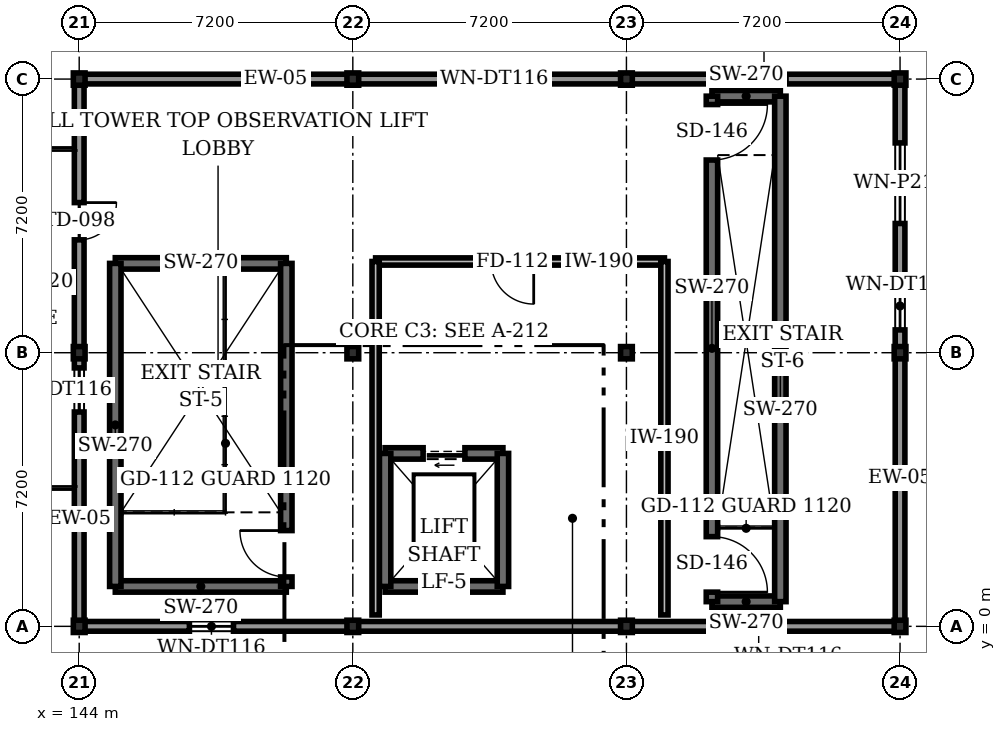
"""IFC4 building model, lengths in metres.
Left out: names, types, materials, properties, quantities, classifications, styles, units other than length and angle.
Written with IfcOpenShell. Run it as: python <this file> out.ifc"""

import sys

from ifc_helpers import new_model, si_unit, direction, frame, frame_2d, origin, origin_2d, place, context, subcontext, project, spatial, rectangle, i_section, extrude, element, fill, save


model = new_model("IFC4")
c1 = context("Model", 3, precision=1e-05, world=origin(), true_north=direction((0.0, 1.0)))
c2 = subcontext(c1, "Body", "Model", "MODEL_VIEW")
j1 = project(units=[si_unit("LENGTHUNIT", "METRE"), si_unit("PLANEANGLEUNIT", "RADIAN")], contexts=[c1])
p1 = place(None, origin())
s1 = spatial("IfcSite", under=j1, at=p1, CompositionType="ELEMENT")
p2 = place(p1, origin())
s2 = spatial("IfcBuilding", under=s1, at=p2, CompositionType="ELEMENT")
p3 = place(p2, frame((0.0, 0.0, 22.2)))
s3 = spatial("IfcBuildingStorey", under=s2, at=p3, CompositionType="ELEMENT", Elevation=22.2)
for number, where, z_axis, x_axis in (
    (1, (144.0, 0.0, 0.0), (0.0, 0.0, 1.0), (1.0, 0.0, 0.0)),
    (2, (144.0, 7.2, 0.0), (0.0, 0.0, 1.0), (1.0, 0.0, 0.0)),
    (3, (144.0, 14.4, 0.0), (0.0, 0.0, 1.0), (1.0, 0.0, 0.0)),
    (4, (151.2, 0.0, 0.0), (0.0, 0.0, 1.0), (1.0, 0.0, 0.0)),
    (5, (151.2, 7.2, 0.0), (0.0, 0.0, 1.0), (1.0, 0.0, 0.0)),
    (6, (151.2, 14.4, 0.0), (0.0, 0.0, 1.0), (1.0, 0.0, 0.0)),
    (7, (158.4, 0.0, 0.0), (0.0, 0.0, 1.0), (1.0, 0.0, 0.0)),
    (8, (158.4, 7.2, 0.0), (0.0, 0.0, 1.0), (1.0, 0.0, 0.0)),
    (9, (158.4, 14.4, 0.0), (0.0, 0.0, 1.0), (1.0, 0.0, 0.0)),
    (10, (165.6, 0.0, 0.0), (0.0, 0.0, 1.0), (1.0, 0.0, 0.0)),
    (11, (165.6, 7.2, 0.0), (0.0, 0.0, 1.0), (1.0, 0.0, 0.0)),
    (12, (165.6, 14.4, 0.0), (0.0, 0.0, 1.0), (1.0, 0.0, 0.0)),
):
    element("IfcColumn", number, at=place(p3, frame(where, z_axis=z_axis, x_axis=x_axis)), inside=s3, PredefinedType="COLUMN", context=c2, shape_type="SweptSolid", body=[
        extrude(i_section(OverallWidth=0.309, OverallDepth=0.323, WebThickness=0.014, FlangeThickness=0.023, at=origin_2d()), origin(), (0.0, 0.0, 1.0), 4.2),
    ])
p4 = place(p3, frame((165.6, 0.0, 0.0), z_axis=(0.0, 0.0, 1.0), x_axis=(-1.0, 0.0, 0.0)))
e13 = element("IfcWall", 13, at=p4, inside=s3, PredefinedType="STANDARD", context=c2, shape_type="SweptSolid", body=[
    extrude(rectangle(XDim=21.6, YDim=0.255, at=frame_2d((10.8, 0.0))), origin(), (0.0, 0.0, 1.0), 3.35),
])
p5 = place(p4, frame((17.54, 0.0, 1.15)))
e14 = element("IfcOpeningElement", 14, at=p5, cuts=e13, PredefinedType="OPENING", context=c2, shape_type="SweptSolid", body=[
    extrude(rectangle(XDim=1.16, YDim=1.34, at=frame_2d((0.58, 0.67))), frame((0.0, 0.137, 0.0), z_axis=(0.0, -1.0, 0.0), x_axis=(1.0, 0.0, 0.0)), (0.0, 0.0, 1.0), 0.275),
])
p6 = place(p4, frame((3.14, 0.0, 1.15)))
e15 = element("IfcOpeningElement", 15, at=p6, cuts=e13, PredefinedType="OPENING", context=c2, shape_type="SweptSolid", body=[
    extrude(rectangle(XDim=1.16, YDim=1.34, at=frame_2d((0.58, 0.67))), frame((0.0, 0.137, 0.0), z_axis=(0.0, -1.0, 0.0), x_axis=(1.0, 0.0, 0.0)), (0.0, 0.0, 1.0), 0.275),
])
p7 = place(p3, frame((165.6, 0.0, 0.0), z_axis=(0.0, 0.0, 1.0), x_axis=(0.0, 1.0, 0.0)))
e16 = element("IfcWall", 16, at=p7, inside=s3, PredefinedType="STANDARD", context=c2, shape_type="SweptSolid", body=[
    extrude(rectangle(XDim=14.4, YDim=0.255, at=frame_2d((7.2, 0.0))), origin(), (0.0, 0.0, 1.0), 3.35),
])
p8 = place(p7, frame((7.8, 0.0, 1.05)))
e17 = element("IfcOpeningElement", 17, at=p8, cuts=e16, PredefinedType="OPENING", context=c2, shape_type="SweptSolid", body=[
    extrude(rectangle(XDim=1.26, YDim=1.38, at=frame_2d((0.63, 0.69))), frame((0.0, 0.137, 0.0), z_axis=(0.0, -1.0, 0.0), x_axis=(1.0, 0.0, 0.0)), (0.0, 0.0, 1.0), 0.275),
])
p9 = place(p7, frame((10.6, 0.0, 1.05)))
e18 = element("IfcOpeningElement", 18, at=p9, cuts=e16, PredefinedType="OPENING", context=c2, shape_type="SweptSolid", body=[
    extrude(rectangle(XDim=2.12, YDim=1.76, at=frame_2d((1.06, 0.88))), frame((0.0, 0.137, 0.0), z_axis=(0.0, -1.0, 0.0), x_axis=(1.0, 0.0, 0.0)), (0.0, 0.0, 1.0), 0.275),
])
p10 = place(p3, frame((144.0, 14.4, 0.0), z_axis=(0.0, 0.0, 1.0), x_axis=(0.0, -1.0, 0.0)))
e19 = element("IfcWall", 19, at=p10, inside=s3, PredefinedType="STANDARD", context=c2, shape_type="SweptSolid", body=[
    extrude(rectangle(XDim=14.4, YDim=0.255, at=frame_2d((7.2, 0.0))), origin(), (0.0, 0.0, 1.0), 3.35),
])
p11 = place(p10, frame((3.25, 0.0, 0.0)))
e20 = element("IfcOpeningElement", 20, at=p11, cuts=e19, PredefinedType="OPENING", context=c2, shape_type="SweptSolid", body=[
    extrude(rectangle(XDim=0.98, YDim=2.12, at=frame_2d((0.49, 1.06))), frame((0.0, 0.137, 0.0), z_axis=(0.0, -1.0, 0.0), x_axis=(1.0, 0.0, 0.0)), (0.0, 0.0, 1.0), 0.275),
])
p12 = place(p10, frame((7.6, 0.0, 1.05)))
e21 = element("IfcOpeningElement", 21, at=p12, cuts=e19, PredefinedType="OPENING", context=c2, shape_type="SweptSolid", body=[
    extrude(rectangle(XDim=1.16, YDim=1.34, at=frame_2d((0.58, 0.67))), frame((0.0, 0.137, 0.0), z_axis=(0.0, -1.0, 0.0), x_axis=(1.0, 0.0, 0.0)), (0.0, 0.0, 1.0), 0.275),
])
p13 = place(p3, frame((165.6, 14.4, 0.0), z_axis=(0.0, 0.0, 1.0), x_axis=(-1.0, 0.0, 0.0)))
e22 = element("IfcWall", 22, at=p13, inside=s3, PredefinedType="STANDARD", context=c2, shape_type="SweptSolid", body=[
    extrude(rectangle(XDim=21.6, YDim=0.255, at=frame_2d((10.8, 0.0))), origin(), (0.0, 0.0, 1.0), 3.35),
])
p14 = place(p13, frame((3.0, 0.0, 1.15)))
e23 = element("IfcOpeningElement", 23, at=p14, cuts=e22, PredefinedType="OPENING", context=c2, shape_type="SweptSolid", body=[
    extrude(rectangle(XDim=1.16, YDim=1.34, at=frame_2d((0.58, 0.67))), frame((0.0, 0.137, 0.0), z_axis=(0.0, -1.0, 0.0), x_axis=(1.0, 0.0, 0.0)), (0.0, 0.0, 1.0), 0.275),
])
p15 = place(p13, frame((10.1, 0.0, 1.15)))
e24 = element("IfcOpeningElement", 24, at=p15, cuts=e22, PredefinedType="OPENING", context=c2, shape_type="SweptSolid", body=[
    extrude(rectangle(XDim=1.16, YDim=1.34, at=frame_2d((0.58, 0.67))), frame((0.0, 0.137, 0.0), z_axis=(0.0, -1.0, 0.0), x_axis=(1.0, 0.0, 0.0)), (0.0, 0.0, 1.0), 0.275),
])
for number, where, z_axis, x_axis in (
    (25, (144.95, 1.05, 0.0), (0.0, 0.0, 1.0), (1.0, 0.0, 0.0)),
    (26, (149.45, 9.55, 0.0), (0.0, 0.0, 1.0), (-1.0, 0.0, 0.0)),
):
    element("IfcWall", number, at=place(p3, frame(where, z_axis=z_axis, x_axis=x_axis)), inside=s3, PredefinedType="SHEAR", context=c2, shape_type="SweptSolid", body=[
        extrude(rectangle(XDim=4.5, YDim=0.3, at=frame_2d((2.25, 0.0))), origin(), (0.0, 0.0, 1.0), 3.99),
    ])
p16 = place(p3, frame((144.95, 9.55, 0.0), z_axis=(0.0, 0.0, 1.0), x_axis=(0.0, -1.0, 0.0)))
e27 = element("IfcWall", 27, at=p16, inside=s3, PredefinedType="SHEAR", context=c2, shape_type="SweptSolid", body=[
    extrude(rectangle(XDim=8.5, YDim=0.3, at=frame_2d((4.25, 0.0))), origin(), (0.0, 0.0, 1.0), 3.99),
])
p17 = place(p3, frame((149.45, 1.05, 0.0), z_axis=(0.0, 0.0, 1.0), x_axis=(0.0, 1.0, 0.0)))
e28 = element("IfcWall", 28, at=p17, inside=s3, PredefinedType="SHEAR", context=c2, shape_type="SweptSolid", body=[
    extrude(rectangle(XDim=8.5, YDim=0.3, at=frame_2d((4.25, 0.0))), origin(), (0.0, 0.0, 1.0), 3.99),
])
p18 = place(p17, frame((0.25, 0.0, 0.0)))
e29 = element("IfcOpeningElement", 29, at=p18, cuts=e28, PredefinedType="OPENING", context=c2, shape_type="SweptSolid", body=[
    extrude(rectangle(XDim=1.22, YDim=2.16, at=frame_2d((0.61, 1.08))), frame((0.0, 0.16, 0.0), z_axis=(0.0, -1.0, 0.0), x_axis=(1.0, 0.0, 0.0)), (0.0, 0.0, 1.0), 0.32),
])
p19 = place(p3, frame((152.05, 1.05, 0.0), z_axis=(0.0, 0.0, 1.0), x_axis=(1.0, 0.0, 0.0)))
e30 = element("IfcWall", 30, at=p19, inside=s3, PredefinedType="SHEAR", context=c2, shape_type="SweptSolid", body=[
    extrude(rectangle(XDim=3.1, YDim=0.3, at=frame_2d((1.55, 0.0))), origin(), (0.0, 0.0, 1.0), 3.99),
])
p20 = place(p3, frame((155.15, 4.55, 0.0), z_axis=(0.0, 0.0, 1.0), x_axis=(-1.0, 0.0, 0.0)))
e31 = element("IfcWall", 31, at=p20, inside=s3, PredefinedType="SHEAR", context=c2, shape_type="SweptSolid", body=[
    extrude(rectangle(XDim=3.1, YDim=0.3, at=frame_2d((1.55, 0.0))), origin(), (0.0, 0.0, 1.0), 3.99),
])
p21 = place(p20, frame((1.0, 0.0, 0.0)))
e32 = element("IfcOpeningElement", 32, at=p21, cuts=e31, PredefinedType="OPENING", context=c2, shape_type="SweptSolid", body=[
    extrude(rectangle(XDim=1.1, YDim=2.22, at=frame_2d((0.55, 1.11))), frame((0.0, 0.16, 0.0), z_axis=(0.0, -1.0, 0.0), x_axis=(1.0, 0.0, 0.0)), (0.0, 0.0, 1.0), 0.32),
])
for number, where, z_axis, x_axis in (
    (33, (152.05, 4.55, 0.0), (0.0, 0.0, 1.0), (0.0, -1.0, 0.0)),
    (34, (155.15, 1.05, 0.0), (0.0, 0.0, 1.0), (0.0, 1.0, 0.0)),
):
    element("IfcWall", number, at=place(p3, frame(where, z_axis=z_axis, x_axis=x_axis)), inside=s3, PredefinedType="SHEAR", context=c2, shape_type="SweptSolid", body=[
        extrude(rectangle(XDim=3.5, YDim=0.3, at=frame_2d((1.75, 0.0))), origin(), (0.0, 0.0, 1.0), 3.99),
    ])
for number, where, z_axis, x_axis in (
    (35, (160.65, 0.65, 0.0), (0.0, 0.0, 1.0), (1.0, 0.0, 0.0)),
    (36, (162.45, 13.95, 0.0), (0.0, 0.0, 1.0), (-1.0, 0.0, 0.0)),
):
    element("IfcWall", number, at=place(p3, frame(where, z_axis=z_axis, x_axis=x_axis)), inside=s3, PredefinedType="SHEAR", context=c2, shape_type="SweptSolid", body=[
        extrude(rectangle(XDim=1.8, YDim=0.3, at=frame_2d((0.9, 0.0))), origin(), (0.0, 0.0, 1.0), 3.99),
    ])
p22 = place(p3, frame((160.65, 13.95, 0.0), z_axis=(0.0, 0.0, 1.0), x_axis=(0.0, -1.0, 0.0)))
e37 = element("IfcWall", 37, at=p22, inside=s3, PredefinedType="SHEAR", context=c2, shape_type="SweptSolid", body=[
    extrude(rectangle(XDim=13.3, YDim=0.3, at=frame_2d((6.65, 0.0))), origin(), (0.0, 0.0, 1.0), 3.99),
])
p23 = place(p22, frame((11.59, 0.0, 0.0)))
e38 = element("IfcOpeningElement", 38, at=p23, cuts=e37, PredefinedType="OPENING", context=c2, shape_type="SweptSolid", body=[
    extrude(rectangle(XDim=1.46, YDim=2.24, at=frame_2d((0.73, 1.12))), frame((0.0, 0.16, 0.0), z_axis=(0.0, -1.0, 0.0), x_axis=(1.0, 0.0, 0.0)), (0.0, 0.0, 1.0), 0.32),
])
p24 = place(p22, frame((0.22, 0.0, 0.0)))
e39 = element("IfcOpeningElement", 39, at=p24, cuts=e37, PredefinedType="OPENING", context=c2, shape_type="SweptSolid", body=[
    extrude(rectangle(XDim=1.46, YDim=2.24, at=frame_2d((0.73, 1.12))), frame((0.0, 0.16, 0.0), z_axis=(0.0, -1.0, 0.0), x_axis=(1.0, 0.0, 0.0)), (0.0, 0.0, 1.0), 0.32),
])
p25 = place(p3, frame((162.45, 0.65, 0.0), z_axis=(0.0, 0.0, 1.0), x_axis=(0.0, 1.0, 0.0)))
e40 = element("IfcWall", 40, at=p25, inside=s3, PredefinedType="SHEAR", context=c2, shape_type="SweptSolid", body=[
    extrude(rectangle(XDim=13.3, YDim=0.3, at=frame_2d((6.65, 0.0))), origin(), (0.0, 0.0, 1.0), 3.99),
])
p26 = place(p3, frame((159.4, 9.6, 0.0), z_axis=(0.0, 0.0, 1.0), x_axis=(-1.0, 0.0, 0.0)))
e41 = element("IfcWall", 41, at=p26, inside=s3, PredefinedType="STANDARD", context=c2, shape_type="SweptSolid", body=[
    extrude(rectangle(XDim=7.6, YDim=0.19, at=frame_2d((3.8, 0.0))), origin(), (0.0, 0.0, 1.0), 3.457),
])
p27 = place(p26, frame((3.44, 0.0, 0.0)))
e42 = element("IfcOpeningElement", 42, at=p27, cuts=e41, PredefinedType="OPENING", context=c2, shape_type="SweptSolid", body=[
    extrude(rectangle(XDim=1.12, YDim=2.16, at=frame_2d((0.56, 1.08))), frame((0.0, 0.105, 0.0), z_axis=(0.0, -1.0, 0.0), x_axis=(1.0, 0.0, 0.0)), (0.0, 0.0, 1.0), 0.21),
])
for number, where, z_axis, x_axis in (
    (43, (151.8, 9.6, 0.0), (0.0, 0.0, 1.0), (0.0, -1.0, 0.0)),
    (44, (159.4, 0.3, 0.0), (0.0, 0.0, 1.0), (0.0, 1.0, 0.0)),
):
    element("IfcWall", number, at=place(p3, frame(where, z_axis=z_axis, x_axis=x_axis)), inside=s3, PredefinedType="STANDARD", context=c2, shape_type="SweptSolid", body=[
        extrude(rectangle(XDim=9.3, YDim=0.19, at=frame_2d((4.65, 0.0))), origin(), (0.0, 0.0, 1.0), 3.457),
    ])
p28 = place(p5, origin())
e45 = element("IfcWindow", 45, at=p28, inside=s3, PartitioningType="SINGLE_PANEL", PredefinedType="WINDOW", context=c2, shape_type="SweptSolid", body=[
    extrude(rectangle(XDim=1.16, YDim=1.34, at=frame_2d((0.58, 0.67))), frame((0.0, 0.03, 0.0), z_axis=(0.0, -1.0, 0.0), x_axis=(1.0, 0.0, 0.0)), (0.0, 0.0, 1.0), 0.06),
])
fill(e14, e45)
p29 = place(p6, origin())
e46 = element("IfcWindow", 46, at=p29, inside=s3, PartitioningType="SINGLE_PANEL", PredefinedType="WINDOW", context=c2, shape_type="SweptSolid", body=[
    extrude(rectangle(XDim=1.16, YDim=1.34, at=frame_2d((0.58, 0.67))), frame((0.0, 0.03, 0.0), z_axis=(0.0, -1.0, 0.0), x_axis=(1.0, 0.0, 0.0)), (0.0, 0.0, 1.0), 0.06),
])
fill(e15, e46)
p30 = place(p8, origin())
e47 = element("IfcWindow", 47, at=p30, inside=s3, PartitioningType="SINGLE_PANEL", PredefinedType="WINDOW", context=c2, shape_type="SweptSolid", body=[
    extrude(rectangle(XDim=1.26, YDim=1.38, at=frame_2d((0.63, 0.69))), frame((0.0, 0.03, 0.0), z_axis=(0.0, -1.0, 0.0), x_axis=(1.0, 0.0, 0.0)), (0.0, 0.0, 1.0), 0.06),
])
fill(e17, e47)
p31 = place(p9, origin())
e48 = element("IfcWindow", 48, at=p31, inside=s3, PartitioningType="SINGLE_PANEL", PredefinedType="WINDOW", context=c2, shape_type="SweptSolid", body=[
    extrude(rectangle(XDim=2.12, YDim=1.76, at=frame_2d((1.06, 0.88))), frame((0.0, 0.03, 0.0), z_axis=(0.0, -1.0, 0.0), x_axis=(1.0, 0.0, 0.0)), (0.0, 0.0, 1.0), 0.06),
])
fill(e18, e48)
p32 = place(p11, origin())
e49 = element("IfcDoor", 49, at=p32, inside=s3, OperationType="SINGLE_SWING_LEFT", PredefinedType="DOOR", context=c2, shape_type="SweptSolid", body=[
    extrude(rectangle(XDim=0.98, YDim=2.12, at=frame_2d((0.49, 1.06))), frame((0.0, 0.025, 0.0), z_axis=(0.0, -1.0, 0.0), x_axis=(1.0, 0.0, 0.0)), (0.0, 0.0, 1.0), 0.05),
])
fill(e20, e49)
p33 = place(p12, origin())
e50 = element("IfcWindow", 50, at=p33, inside=s3, PartitioningType="SINGLE_PANEL", PredefinedType="WINDOW", context=c2, shape_type="SweptSolid", body=[
    extrude(rectangle(XDim=1.16, YDim=1.34, at=frame_2d((0.58, 0.67))), frame((0.0, 0.03, 0.0), z_axis=(0.0, -1.0, 0.0), x_axis=(1.0, 0.0, 0.0)), (0.0, 0.0, 1.0), 0.06),
])
fill(e21, e50)
p34 = place(p14, origin())
e51 = element("IfcWindow", 51, at=p34, inside=s3, PartitioningType="SINGLE_PANEL", PredefinedType="WINDOW", context=c2, shape_type="SweptSolid", body=[
    extrude(rectangle(XDim=1.16, YDim=1.34, at=frame_2d((0.58, 0.67))), frame((0.0, 0.03, 0.0), z_axis=(0.0, -1.0, 0.0), x_axis=(1.0, 0.0, 0.0)), (0.0, 0.0, 1.0), 0.06),
])
fill(e23, e51)
p35 = place(p15, origin())
e52 = element("IfcWindow", 52, at=p35, inside=s3, PartitioningType="SINGLE_PANEL", PredefinedType="WINDOW", context=c2, shape_type="SweptSolid", body=[
    extrude(rectangle(XDim=1.16, YDim=1.34, at=frame_2d((0.58, 0.67))), frame((0.0, 0.03, 0.0), z_axis=(0.0, -1.0, 0.0), x_axis=(1.0, 0.0, 0.0)), (0.0, 0.0, 1.0), 0.06),
])
fill(e24, e52)
p36 = place(p2, frame((0.0, 0.0, 26.4)))
p37 = place(p36, frame((0.0, 0.0, -0.21)))
p38 = place(p37, frame((152.5, 7.2, 0.16)))
e53 = element("IfcWindow", 53, at=p38, inside=s3, PartitioningType="SINGLE_PANEL", PredefinedType="SKYLIGHT", context=c2, shape_type="SweptSolid", body=[
    extrude(rectangle(XDim=1.24, YDim=1.24, at=origin_2d()), origin(), (0.0, 0.0, 1.0), 0.05),
])
p39 = place(p37, frame((156.5, 7.2, 0.16)))
e54 = element("IfcWindow", 54, at=p39, inside=s3, PartitioningType="SINGLE_PANEL", PredefinedType="SKYLIGHT", context=c2, shape_type="SweptSolid", body=[
    extrude(rectangle(XDim=1.14, YDim=1.14, at=origin_2d()), origin(), (0.0, 0.0, 1.0), 0.05),
])
p40 = place(p18, origin())
e55 = element("IfcDoor", 55, at=p40, inside=s3, OperationType="SINGLE_SWING_RIGHT", PredefinedType="DOOR", context=c2, shape_type="SweptSolid", body=[
    extrude(rectangle(XDim=1.22, YDim=2.16, at=frame_2d((0.61, 1.08))), frame((0.0, 0.025, 0.0), z_axis=(0.0, -1.0, 0.0), x_axis=(1.0, 0.0, 0.0)), (0.0, 0.0, 1.0), 0.05),
])
fill(e29, e55)
p41 = place(p21, origin())
e56 = element("IfcDoor", 56, at=p41, inside=s3, OperationType="SLIDING_TO_LEFT", PredefinedType="DOOR", context=c2, shape_type="SweptSolid", body=[
    extrude(rectangle(XDim=1.1, YDim=2.22, at=frame_2d((0.55, 1.11))), frame((0.0, 0.025, 0.0), z_axis=(0.0, -1.0, 0.0), x_axis=(1.0, 0.0, 0.0)), (0.0, 0.0, 1.0), 0.05),
])
fill(e32, e56)
p42 = place(p23, origin())
e57 = element("IfcDoor", 57, at=p42, inside=s3, OperationType="SINGLE_SWING_RIGHT", PredefinedType="DOOR", context=c2, shape_type="SweptSolid", body=[
    extrude(rectangle(XDim=1.46, YDim=2.24, at=frame_2d((0.73, 1.12))), frame((0.0, 0.025, 0.0), z_axis=(0.0, -1.0, 0.0), x_axis=(1.0, 0.0, 0.0)), (0.0, 0.0, 1.0), 0.05),
])
fill(e38, e57)
p43 = place(p24, origin())
e58 = element("IfcDoor", 58, at=p43, inside=s3, OperationType="SINGLE_SWING_LEFT", PredefinedType="DOOR", context=c2, shape_type="SweptSolid", body=[
    extrude(rectangle(XDim=1.46, YDim=2.24, at=frame_2d((0.73, 1.12))), frame((0.0, 0.025, 0.0), z_axis=(0.0, -1.0, 0.0), x_axis=(1.0, 0.0, 0.0)), (0.0, 0.0, 1.0), 0.05),
])
fill(e39, e58)
p44 = place(p27, origin())
e59 = element("IfcDoor", 59, at=p44, inside=s3, OperationType="SINGLE_SWING_LEFT", PredefinedType="DOOR", context=c2, shape_type="SweptSolid", body=[
    extrude(rectangle(XDim=1.12, YDim=2.16, at=frame_2d((0.56, 1.08))), frame((0.0, 0.025, 0.0), z_axis=(0.0, -1.0, 0.0), x_axis=(1.0, 0.0, 0.0)), (0.0, 0.0, 1.0), 0.05),
])
fill(e42, e59)
save(model, sys.argv[1])
